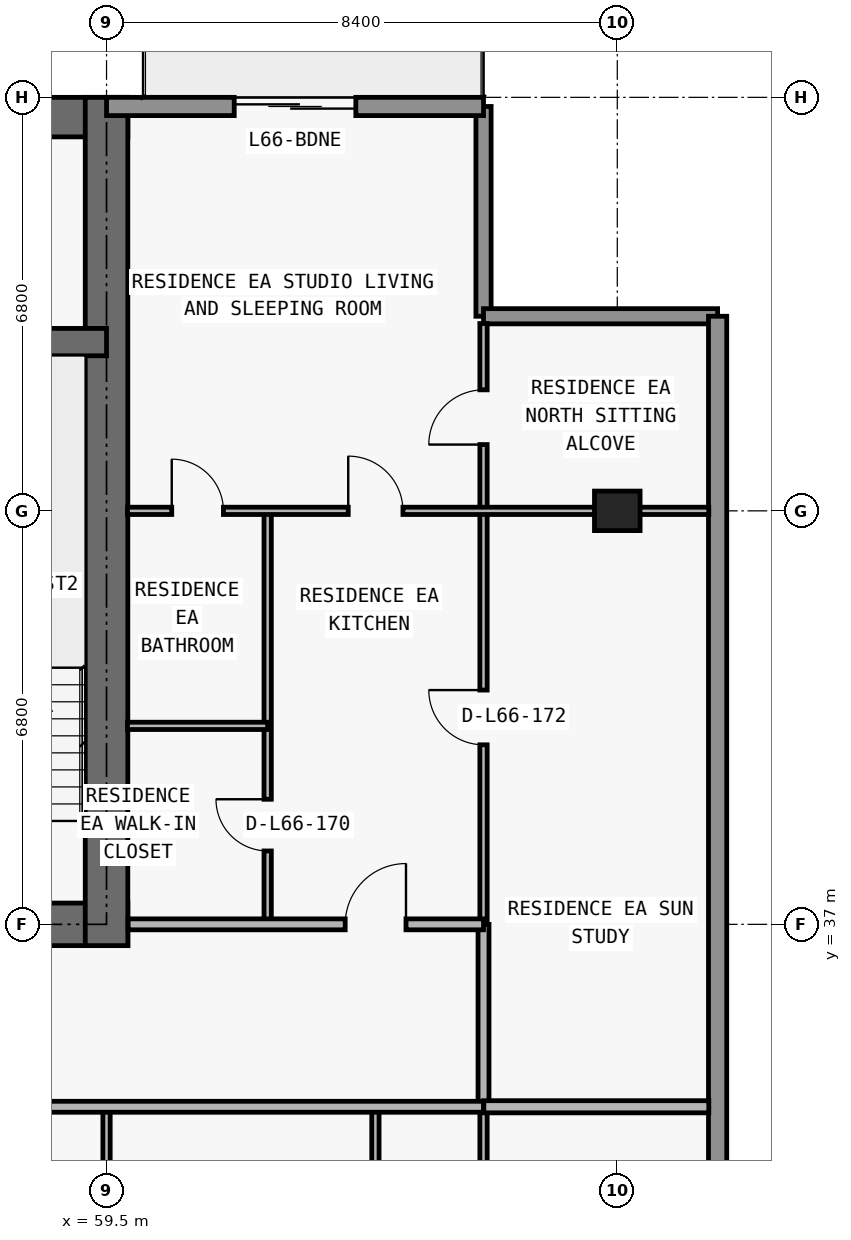
"""IFC4 building model, lengths in metres.
Left out: names, types, materials, properties, quantities, classifications, styles, units other than length and angle.
Written with IfcOpenShell. Run it as: python <this file> out.ifc"""

import sys

from ifc_helpers import new_model, si_unit, direction, frame, frame_2d, origin, origin_2d, place, context, subcontext, project, spatial, rectangle, extrude, element, fill, save


model = new_model("IFC4")
c1 = context("Model", 3, precision=1e-05, world=origin(), true_north=direction((0.0, 1.0)))
c2 = subcontext(c1, "Body", "Model", "MODEL_VIEW")
j1 = project(units=[si_unit("LENGTHUNIT", "METRE"), si_unit("PLANEANGLEUNIT", "RADIAN")], contexts=[c1])
p1 = place(None, origin())
s1 = spatial("IfcSite", under=j1, at=p1, CompositionType="ELEMENT")
p2 = place(p1, origin())
s2 = spatial("IfcBuilding", under=s1, at=p2, CompositionType="ELEMENT")
p3 = place(p2, frame((0.0, 0.0, 236.4)))
s3 = spatial("IfcBuildingStorey", under=s2, at=p3, CompositionType="ELEMENT", Elevation=236.4)
p4 = place(p3, frame((67.9, 43.8, 0.0), z_axis=(0.0, 0.0, 1.0), x_axis=(1.0, 0.0, 0.0)))
e1 = element("IfcColumn", 1, at=p4, inside=s3, PredefinedType="COLUMN", context=c2, shape_type="SweptSolid", body=[
    extrude(rectangle(XDim=0.75, YDim=0.65, at=origin_2d()), origin(), (0.0, 0.0, 1.0), 3.05),
])
p5 = place(p3, frame((17.95, 37.0, 0.0), z_axis=(0.0, 0.0, 1.0), x_axis=(1.0, 0.0, 0.0)))
e2 = element("IfcWall", 2, at=p5, inside=s3, PredefinedType="SHEAR", context=c2, shape_type="SweptSolid", body=[
    extrude(rectangle(XDim=41.9, YDim=0.7, at=frame_2d((20.95, 0.0))), origin(), (0.0, 0.0, 1.0), 3.05),
])
p6 = place(p5, frame((14.35, 0.0, 0.0)))
e3 = element("IfcOpeningElement", 3, at=p6, cuts=e2, PredefinedType="OPENING", context=c2, shape_type="SweptSolid", body=[
    extrude(rectangle(XDim=1.1, YDim=2.15, at=frame_2d((0.55, 1.075))), frame((0.0, 0.36, 0.0), z_axis=(0.0, -1.0, 0.0), x_axis=(1.0, 0.0, 0.0)), (0.0, 0.0, 1.0), 0.72),
])
p7 = place(p5, frame((6.2, 0.0, 0.0)))
e4 = element("IfcOpeningElement", 4, at=p7, cuts=e2, PredefinedType="OPENING", context=c2, shape_type="SweptSolid", body=[
    extrude(rectangle(XDim=1.05, YDim=2.15, at=frame_2d((0.525, 1.075))), frame((0.0, 0.36, 0.0), z_axis=(0.0, -1.0, 0.0), x_axis=(1.0, 0.0, 0.0)), (0.0, 0.0, 1.0), 0.72),
])
p8 = place(p5, frame((34.7, 0.0, 0.0)))
e5 = element("IfcOpeningElement", 5, at=p8, cuts=e2, PredefinedType="OPENING", context=c2, shape_type="SweptSolid", body=[
    extrude(rectangle(XDim=1.05, YDim=2.15, at=frame_2d((0.525, 1.075))), frame((0.0, 0.36, 0.0), z_axis=(0.0, -1.0, 0.0), x_axis=(1.0, 0.0, 0.0)), (0.0, 0.0, 1.0), 0.72),
])
p9 = place(p5, frame((10.812, 0.0, 0.0)))
e6 = element("IfcOpeningElement", 6, at=p9, cuts=e2, PredefinedType="OPENING", context=c2, shape_type="SweptSolid", body=[
    extrude(rectangle(XDim=1.05, YDim=2.15, at=frame_2d((0.525, 1.075))), frame((0.0, 0.36, 0.0), z_axis=(0.0, -1.0, 0.0), x_axis=(1.0, 0.0, 0.0)), (0.0, 0.0, 1.0), 0.72),
])
p10 = place(p5, frame((24.05, 0.0, 0.0)))
e7 = element("IfcOpeningElement", 7, at=p10, cuts=e2, PredefinedType="OPENING", context=c2, shape_type="SweptSolid", body=[
    extrude(rectangle(XDim=1.05, YDim=2.15, at=frame_2d((0.525, 1.075))), frame((0.0, 0.36, 0.0), z_axis=(0.0, -1.0, 0.0), x_axis=(1.0, 0.0, 0.0)), (0.0, 0.0, 1.0), 0.72),
])
p11 = place(p3, frame((17.95, 50.275, 0.0), z_axis=(0.0, 0.0, 1.0), x_axis=(1.0, 0.0, 0.0)))
e8 = element("IfcWall", 8, at=p11, inside=s3, PredefinedType="SHEAR", context=c2, shape_type="SweptSolid", body=[
    extrude(rectangle(XDim=41.9, YDim=0.65, at=frame_2d((20.95, 0.0))), origin(), (0.0, 0.0, 1.0), 3.05),
])
p12 = place(p3, frame((59.5, 36.65, 0.0), z_axis=(0.0, 0.0, 1.0), x_axis=(0.0, 1.0, 0.0)))
e9 = element("IfcWall", 9, at=p12, inside=s3, PredefinedType="SHEAR", context=c2, shape_type="SweptSolid", body=[
    extrude(rectangle(XDim=13.95, YDim=0.7, at=frame_2d((6.975, 0.0))), origin(), (0.0, 0.0, 1.0), 3.05),
])
p13 = place(p3, frame((18.3, 46.575, 0.0), z_axis=(0.0, 0.0, 1.0), x_axis=(1.0, 0.0, 0.0)))
e10 = element("IfcWall", 10, at=p13, inside=s3, PredefinedType="SHEAR", context=c2, shape_type="SweptSolid", body=[
    extrude(rectangle(XDim=41.2, YDim=0.45, at=frame_2d((20.6, 0.0))), origin(), (0.0, 0.0, 1.0), 3.05),
])
p14 = place(p13, frame((7.575, 0.0, 0.0)))
e11 = element("IfcOpeningElement", 11, at=p14, cuts=e10, PredefinedType="OPENING", context=c2, shape_type="SweptSolid", body=[
    extrude(rectangle(XDim=1.05, YDim=2.15, at=frame_2d((0.525, 1.075))), frame((0.0, 0.235, 0.0), z_axis=(0.0, -1.0, 0.0), x_axis=(1.0, 0.0, 0.0)), (0.0, 0.0, 1.0), 0.47),
])
p15 = place(p13, frame((32.625, 0.0, 0.0)))
e12 = element("IfcOpeningElement", 12, at=p15, cuts=e10, PredefinedType="OPENING", context=c2, shape_type="SweptSolid", body=[
    extrude(rectangle(XDim=1.05, YDim=2.15, at=frame_2d((0.525, 1.075))), frame((0.0, 0.235, 0.0), z_axis=(0.0, -1.0, 0.0), x_axis=(1.0, 0.0, 0.0)), (0.0, 0.0, 1.0), 0.47),
])
p16 = place(p3, frame((65.7, 50.45, 0.0), z_axis=(0.0, 0.0, 1.0), x_axis=(0.0, -1.0, 0.0)))
e13 = element("IfcWall", 13, at=p16, inside=s3, PredefinedType="ELEMENTEDWALL", context=c2, shape_type="SweptSolid", body=[
    extrude(rectangle(XDim=3.45, YDim=0.25, at=frame_2d((1.725, 0.0))), origin(), (0.0, 0.0, 1.0), 3.05),
])
p17 = place(p3, frame((65.7, 47.0, 0.0), z_axis=(0.0, 0.0, 1.0), x_axis=(1.0, 0.0, 0.0)))
e14 = element("IfcWall", 14, at=p17, inside=s3, PredefinedType="ELEMENTEDWALL", context=c2, shape_type="SweptSolid", body=[
    extrude(rectangle(XDim=3.85, YDim=0.25, at=frame_2d((1.925, 0.0))), origin(), (0.0, 0.0, 1.0), 3.05),
])
p18 = place(p3, frame((69.55, 47.0, 0.0), z_axis=(0.0, 0.0, 1.0), x_axis=(0.0, -1.0, 0.0)))
e15 = element("IfcWall", 15, at=p18, inside=s3, PredefinedType="STANDARD", context=c2, shape_type="SweptSolid", body=[
    extrude(rectangle(XDim=16.85, YDim=0.3, at=frame_2d((8.425, 0.0))), origin(), (0.0, 0.0, 1.0), 3.05),
])
p19 = place(p3, frame((59.5, 50.45, 0.0), z_axis=(0.0, 0.0, 1.0), x_axis=(1.0, 0.0, 0.0)))
e16 = element("IfcWall", 16, at=p19, inside=s3, PredefinedType="STANDARD", context=c2, shape_type="SweptSolid", body=[
    extrude(rectangle(XDim=6.2, YDim=0.3, at=frame_2d((3.1, 0.0))), origin(), (0.0, 0.0, 1.0), 3.05),
])
p20 = place(p19, frame((2.1, 0.0, 0.0)))
e17 = element("IfcOpeningElement", 17, at=p20, cuts=e16, PredefinedType="OPENING", context=c2, shape_type="SweptSolid", body=[
    extrude(rectangle(XDim=2.0, YDim=2.3, at=frame_2d((1.0, 1.15))), frame((0.0, 0.16, 0.0), z_axis=(0.0, -1.0, 0.0), x_axis=(1.0, 0.0, 0.0)), (0.0, 0.0, 1.0), 0.32),
])
p21 = place(p3, frame((59.5, 29.44, 0.0), z_axis=(0.0, 0.0, 1.0), x_axis=(0.0, 1.0, 0.0)))
e18 = element("IfcWall", 18, at=p21, inside=s3, PredefinedType="PARTITIONING", context=c2, shape_type="SweptSolid", body=[
    extrude(rectangle(XDim=4.56, YDim=0.12, at=frame_2d((2.28, 0.0))), origin(), (0.0, 0.0, 1.0), 2.263),
])
p22 = place(p3, frame((62.15, 37.0, 0.0), z_axis=(0.0, 0.0, 1.0), x_axis=(0.0, 1.0, 0.0)))
e19 = element("IfcWall", 19, at=p22, inside=s3, PredefinedType="PARTITIONING", context=c2, shape_type="SweptSolid", body=[
    extrude(rectangle(XDim=6.8, YDim=0.12, at=frame_2d((3.4, 0.0))), origin(), (0.0, 0.0, 1.0), 3.05),
])
p23 = place(p22, frame((1.207, 0.0, 0.0)))
e20 = element("IfcOpeningElement", 20, at=p23, cuts=e19, PredefinedType="OPENING", context=c2, shape_type="SweptSolid", body=[
    extrude(rectangle(XDim=0.85, YDim=2.1, at=frame_2d((0.425, 1.05))), frame((0.0, 0.07, 0.0), z_axis=(0.0, -1.0, 0.0), x_axis=(1.0, 0.0, 0.0)), (0.0, 0.0, 1.0), 0.14),
])
p24 = place(p3, frame((63.922, 29.44, 0.0), z_axis=(0.0, 0.0, 1.0), x_axis=(0.0, 1.0, 0.0)))
e21 = element("IfcWall", 21, at=p24, inside=s3, PredefinedType="PARTITIONING", context=c2, shape_type="SweptSolid", body=[
    extrude(rectangle(XDim=4.56, YDim=0.12, at=frame_2d((2.28, 0.0))), origin(), (0.0, 0.0, 1.0), 3.05),
])
p25 = place(p24, frame((1.855, 0.0, 0.0)))
e22 = element("IfcOpeningElement", 22, at=p25, cuts=e21, PredefinedType="OPENING", context=c2, shape_type="SweptSolid", body=[
    extrude(rectangle(XDim=0.85, YDim=2.1, at=frame_2d((0.425, 1.05))), frame((0.0, 0.07, 0.0), z_axis=(0.0, -1.0, 0.0), x_axis=(1.0, 0.0, 0.0)), (0.0, 0.0, 1.0), 0.14),
])
p26 = place(p3, frame((65.7, 29.44, 0.0), z_axis=(0.0, 0.0, 1.0), x_axis=(0.0, 1.0, 0.0)))
e23 = element("IfcWall", 23, at=p26, inside=s3, PredefinedType="PARTITIONING", context=c2, shape_type="SweptSolid", body=[
    extrude(rectangle(XDim=4.56, YDim=0.12, at=frame_2d((2.28, 0.0))), origin(), (0.0, 0.0, 1.0), 2.629),
])
p27 = place(p3, frame((65.7, 34.005, 0.0), z_axis=(0.0, 0.0, 1.0), x_axis=(0.0, 1.0, 0.0)))
e24 = element("IfcWall", 24, at=p27, inside=s3, PredefinedType="PARTITIONING", context=c2, shape_type="SweptSolid", body=[
    extrude(rectangle(XDim=2.995, YDim=0.18, at=frame_2d((1.498, 0.0))), origin(), (0.0, 0.0, 1.0), 2.629),
])
p28 = place(p3, frame((65.7, 37.005, 0.0), z_axis=(0.0, 0.0, 1.0), x_axis=(0.0, 1.0, 0.0)))
e25 = element("IfcWall", 25, at=p28, inside=s3, PredefinedType="PARTITIONING", context=c2, shape_type="SweptSolid", body=[
    extrude(rectangle(XDim=9.875, YDim=0.12, at=frame_2d((4.938, 0.0))), origin(), (0.0, 0.0, 1.0), 2.629),
])
p29 = place(p28, frame((2.948, 0.0, 0.0)))
e26 = element("IfcOpeningElement", 26, at=p29, cuts=e25, PredefinedType="OPENING", context=c2, shape_type="SweptSolid", body=[
    extrude(rectangle(XDim=0.9, YDim=2.15, at=frame_2d((0.45, 1.075))), frame((0.0, 0.07, 0.0), z_axis=(0.0, -1.0, 0.0), x_axis=(1.0, 0.0, 0.0)), (0.0, 0.0, 1.0), 0.14),
])
p30 = place(p28, frame((7.885, 0.0, 0.0)))
e27 = element("IfcOpeningElement", 27, at=p30, cuts=e25, PredefinedType="OPENING", context=c2, shape_type="SweptSolid", body=[
    extrude(rectangle(XDim=0.9, YDim=2.15, at=frame_2d((0.45, 1.075))), frame((0.0, 0.07, 0.0), z_axis=(0.0, -1.0, 0.0), x_axis=(1.0, 0.0, 0.0)), (0.0, 0.0, 1.0), 0.14),
])
p31 = place(p3, frame((12.105, 34.0, 0.0), z_axis=(0.0, 0.0, 1.0), x_axis=(1.0, 0.0, 0.0)))
e28 = element("IfcWall", 28, at=p31, inside=s3, PredefinedType="PARTITIONING", context=c2, shape_type="SweptSolid", body=[
    extrude(rectangle(XDim=53.595, YDim=0.18, at=frame_2d((26.797, 0.0))), origin(), (0.0, 0.0, 1.0), 3.05),
])
p32 = place(p31, frame((1.607, 0.0, 0.0)))
e29 = element("IfcOpeningElement", 29, at=p32, cuts=e28, PredefinedType="OPENING", context=c2, shape_type="SweptSolid", body=[
    extrude(rectangle(XDim=1.0, YDim=2.2, at=frame_2d((0.5, 1.1))), frame((0.0, 0.1, 0.0), z_axis=(0.0, -1.0, 0.0), x_axis=(1.0, 0.0, 0.0)), (0.0, 0.0, 1.0), 0.2),
])
p33 = place(p31, frame((17.057, 0.0, 0.0)))
e30 = element("IfcOpeningElement", 30, at=p33, cuts=e28, PredefinedType="OPENING", context=c2, shape_type="SweptSolid", body=[
    extrude(rectangle(XDim=1.0, YDim=2.2, at=frame_2d((0.5, 1.1))), frame((0.0, 0.1, 0.0), z_axis=(0.0, -1.0, 0.0), x_axis=(1.0, 0.0, 0.0)), (0.0, 0.0, 1.0), 0.2),
])
p34 = place(p31, frame((25.242, 0.0, 0.0)))
e31 = element("IfcOpeningElement", 31, at=p34, cuts=e28, PredefinedType="OPENING", context=c2, shape_type="SweptSolid", body=[
    extrude(rectangle(XDim=1.0, YDim=2.2, at=frame_2d((0.5, 1.1))), frame((0.0, 0.1, 0.0), z_axis=(0.0, -1.0, 0.0), x_axis=(1.0, 0.0, 0.0)), (0.0, 0.0, 1.0), 0.2),
])
p35 = place(p31, frame((33.092, 0.0, 0.0)))
e32 = element("IfcOpeningElement", 32, at=p35, cuts=e28, PredefinedType="OPENING", context=c2, shape_type="SweptSolid", body=[
    extrude(rectangle(XDim=1.0, YDim=2.2, at=frame_2d((0.5, 1.1))), frame((0.0, 0.1, 0.0), z_axis=(0.0, -1.0, 0.0), x_axis=(1.0, 0.0, 0.0)), (0.0, 0.0, 1.0), 0.2),
])
p36 = place(p31, frame((41.705, 0.0, 0.0)))
e33 = element("IfcOpeningElement", 33, at=p36, cuts=e28, PredefinedType="OPENING", context=c2, shape_type="SweptSolid", body=[
    extrude(rectangle(XDim=1.0, YDim=2.2, at=frame_2d((0.5, 1.1))), frame((0.0, 0.1, 0.0), z_axis=(0.0, -1.0, 0.0), x_axis=(1.0, 0.0, 0.0)), (0.0, 0.0, 1.0), 0.2),
])
p37 = place(p3, frame((65.705, 34.0, 0.0), z_axis=(0.0, 0.0, 1.0), x_axis=(1.0, 0.0, 0.0)))
e34 = element("IfcWall", 34, at=p37, inside=s3, PredefinedType="PARTITIONING", context=c2, shape_type="SweptSolid", body=[
    extrude(rectangle(XDim=3.7, YDim=0.2, at=frame_2d((1.85, 0.0))), origin(), (0.0, 0.0, 1.0), 3.05),
])
p38 = place(p3, frame((59.855, 37.0, 0.0), z_axis=(0.0, 0.0, 1.0), x_axis=(1.0, 0.0, 0.0)))
e35 = element("IfcWall", 35, at=p38, inside=s3, PredefinedType="PARTITIONING", context=c2, shape_type="SweptSolid", body=[
    extrude(rectangle(XDim=5.845, YDim=0.18, at=frame_2d((2.922, 0.0))), origin(), (0.0, 0.0, 1.0), 3.05),
])
p39 = place(p38, frame((3.57, 0.0, 0.0)))
e36 = element("IfcOpeningElement", 36, at=p39, cuts=e35, PredefinedType="OPENING", context=c2, shape_type="SweptSolid", body=[
    extrude(rectangle(XDim=1.0, YDim=2.2, at=frame_2d((0.5, 1.1))), frame((0.0, 0.1, 0.0), z_axis=(0.0, -1.0, 0.0), x_axis=(1.0, 0.0, 0.0)), (0.0, 0.0, 1.0), 0.2),
])
p40 = place(p3, frame((59.845, 40.264, 0.0), z_axis=(0.0, 0.0, 1.0), x_axis=(1.0, 0.0, 0.0)))
e37 = element("IfcWall", 37, at=p40, inside=s3, PredefinedType="PARTITIONING", context=c2, shape_type="SweptSolid", body=[
    extrude(rectangle(XDim=2.305, YDim=0.12, at=frame_2d((1.152, 0.0))), origin(), (0.0, 0.0, 1.0), 3.05),
])
p41 = place(p3, frame((59.845, 43.8, 0.0), z_axis=(0.0, 0.0, 1.0), x_axis=(1.0, 0.0, 0.0)))
e38 = element("IfcWall", 38, at=p41, inside=s3, PredefinedType="PARTITIONING", context=c2, shape_type="SweptSolid", body=[
    extrude(rectangle(XDim=9.56, YDim=0.12, at=frame_2d((4.78, 0.0))), origin(), (0.0, 0.0, 1.0), 2.418),
])
p42 = place(p41, frame((3.63, 0.0, 0.0)))
e39 = element("IfcOpeningElement", 39, at=p42, cuts=e38, PredefinedType="OPENING", context=c2, shape_type="SweptSolid", body=[
    extrude(rectangle(XDim=0.9, YDim=2.15, at=frame_2d((0.45, 1.075))), frame((0.0, 0.07, 0.0), z_axis=(0.0, -1.0, 0.0), x_axis=(1.0, 0.0, 0.0)), (0.0, 0.0, 1.0), 0.14),
])
p43 = place(p41, frame((0.728, 0.0, 0.0)))
e40 = element("IfcOpeningElement", 40, at=p43, cuts=e38, PredefinedType="OPENING", context=c2, shape_type="SweptSolid", body=[
    extrude(rectangle(XDim=0.85, YDim=2.1, at=frame_2d((0.425, 1.05))), frame((0.0, 0.07, 0.0), z_axis=(0.0, -1.0, 0.0), x_axis=(1.0, 0.0, 0.0)), (0.0, 0.0, 1.0), 0.14),
])
p44 = place(p20, origin())
e41 = element("IfcDoor", 41, at=p44, inside=s3, OperationType="DOUBLE_DOOR_SLIDING", PredefinedType="DOOR", context=c2, shape_type="SweptSolid", body=[
    extrude(rectangle(XDim=2.0, YDim=2.3, at=frame_2d((1.0, 1.15))), frame((0.0, 0.025, 0.0), z_axis=(0.0, -1.0, 0.0), x_axis=(1.0, 0.0, 0.0)), (0.0, 0.0, 1.0), 0.05),
])
fill(e17, e41)
p45 = place(p39, origin())
e42 = element("IfcDoor", 42, at=p45, inside=s3, OperationType="SINGLE_SWING_RIGHT", PredefinedType="DOOR", context=c2, shape_type="SweptSolid", body=[
    extrude(rectangle(XDim=1.0, YDim=2.2, at=frame_2d((0.5, 1.1))), frame((0.0, 0.025, 0.0), z_axis=(0.0, -1.0, 0.0), x_axis=(1.0, 0.0, 0.0)), (0.0, 0.0, 1.0), 0.05),
])
fill(e36, e42)
p46 = place(p42, origin())
e43 = element("IfcDoor", 43, at=p46, inside=s3, OperationType="SINGLE_SWING_LEFT", PredefinedType="DOOR", context=c2, shape_type="SweptSolid", body=[
    extrude(rectangle(XDim=0.9, YDim=2.15, at=frame_2d((0.45, 1.075))), frame((0.0, 0.025, 0.0), z_axis=(0.0, -1.0, 0.0), x_axis=(1.0, 0.0, 0.0)), (0.0, 0.0, 1.0), 0.05),
])
fill(e39, e43)
p47 = place(p23, origin())
e44 = element("IfcDoor", 44, at=p47, inside=s3, OperationType="SINGLE_SWING_RIGHT", PredefinedType="DOOR", context=c2, shape_type="SweptSolid", body=[
    extrude(rectangle(XDim=0.85, YDim=2.1, at=frame_2d((0.425, 1.05))), frame((0.0, 0.025, 0.0), z_axis=(0.0, -1.0, 0.0), x_axis=(1.0, 0.0, 0.0)), (0.0, 0.0, 1.0), 0.05),
])
fill(e20, e44)
p48 = place(p43, origin())
e45 = element("IfcDoor", 45, at=p48, inside=s3, OperationType="SINGLE_SWING_LEFT", PredefinedType="DOOR", context=c2, shape_type="SweptSolid", body=[
    extrude(rectangle(XDim=0.85, YDim=2.1, at=frame_2d((0.425, 1.05))), frame((0.0, 0.025, 0.0), z_axis=(0.0, -1.0, 0.0), x_axis=(1.0, 0.0, 0.0)), (0.0, 0.0, 1.0), 0.05),
])
fill(e40, e45)
p49 = place(p29, origin())
e46 = element("IfcDoor", 46, at=p49, inside=s3, OperationType="SINGLE_SWING_RIGHT", PredefinedType="DOOR", context=c2, shape_type="SweptSolid", body=[
    extrude(rectangle(XDim=0.9, YDim=2.15, at=frame_2d((0.45, 1.075))), frame((0.0, 0.025, 0.0), z_axis=(0.0, -1.0, 0.0), x_axis=(1.0, 0.0, 0.0)), (0.0, 0.0, 1.0), 0.05),
])
fill(e26, e46)
p50 = place(p30, origin())
e47 = element("IfcDoor", 47, at=p50, inside=s3, OperationType="SINGLE_SWING_LEFT", PredefinedType="DOOR", context=c2, shape_type="SweptSolid", body=[
    extrude(rectangle(XDim=0.9, YDim=2.15, at=frame_2d((0.45, 1.075))), frame((0.0, 0.025, 0.0), z_axis=(0.0, -1.0, 0.0), x_axis=(1.0, 0.0, 0.0)), (0.0, 0.0, 1.0), 0.05),
])
fill(e27, e47)
save(model, sys.argv[1])
